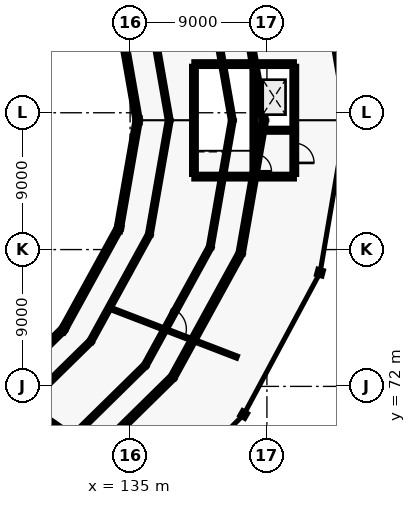
"""IFC4 building model, lengths in metres.
Left out: names, types, materials, properties, quantities, classifications, styles, units other than length and angle.
Written with IfcOpenShell. Run it as: python <this file> out.ifc"""

import sys

from ifc_helpers import new_model, si_unit, direction, frame, frame_2d, origin, origin_2d, place, context, subcontext, project, spatial, rectangle, hollow_circle, extrude, element, fill, save


model = new_model("IFC4")
c1 = context("Model", 3, precision=1e-05, world=origin(), true_north=direction((0.0, 1.0)))
c2 = subcontext(c1, "Body", "Model", "MODEL_VIEW")
j1 = project(units=[si_unit("LENGTHUNIT", "METRE"), si_unit("PLANEANGLEUNIT", "RADIAN")], contexts=[c1])
p1 = place(None, origin())
s1 = spatial("IfcSite", under=j1, at=p1, CompositionType="ELEMENT")
p2 = place(p1, origin())
s2 = spatial("IfcBuilding", under=s1, at=p2, CompositionType="ELEMENT")
p3 = place(p2, frame((0.0, 0.0, 9.6)))
s3 = spatial("IfcBuildingStorey", under=s2, at=p3, CompositionType="ELEMENT", Elevation=9.6)
for number, where, z_axis, x_axis in (
    (1, (135.5, 89.5, 0.0), (0.0, 0.0, 1.0), (1.0, 0.0, 0.0)),
    (2, (130.61, 75.75, 0.0), (0.0, 0.0, 1.0), (0.866, -0.5, 0.0)),
):
    element("IfcColumn", number, at=place(p3, frame(where, z_axis=z_axis, x_axis=x_axis)), inside=s3, PredefinedType="COLUMN", context=c2, shape_type="SweptSolid", body=[
        extrude(hollow_circle(Radius=0.162, WallThickness=0.016, at=origin_2d()), origin(), (0.0, 0.0, 1.0), 4.38),
    ])
p4 = place(p3, frame((142.474, 70.15, 0.0), z_axis=(0.0, 0.0, 1.0), x_axis=(0.866025403784, -0.5, 0.0)))
e3 = element("IfcColumn", 3, at=p4, inside=s3, PredefinedType="COLUMN", context=c2, shape_type="SweptSolid", body=[
    extrude(hollow_circle(Radius=0.178, WallThickness=0.016, at=origin_2d()), origin(), (0.0, 0.0, 1.0), 3.38),
])
p5 = place(p3, frame((134.256, 82.382, 0.0), z_axis=(0.0, 0.0, 1.0), x_axis=(0.965925826289, -0.258819045103, 0.0)))
e4 = element("IfcColumn", 4, at=p5, inside=s3, PredefinedType="COLUMN", context=c2, shape_type="SweptSolid", body=[
    extrude(hollow_circle(Radius=0.162, WallThickness=0.016, at=origin_2d()), origin(), (0.0, 0.0, 1.0), 4.38),
])
p6 = place(p3, frame((147.489, 79.484, 0.0), z_axis=(0.0, 0.0, 1.0), x_axis=(0.965925826289, -0.258819045103, 0.0)))
e5 = element("IfcColumn", 5, at=p6, inside=s3, PredefinedType="COLUMN", context=c2, shape_type="SweptSolid", body=[
    extrude(hollow_circle(Radius=0.178, WallThickness=0.016, at=origin_2d()), origin(), (0.0, 0.0, 1.0), 3.38),
])
p7 = place(p3, frame((143.8, 89.5, 4.53), z_axis=(0.0, 0.0, 1.0), x_axis=(-0.171964181022, 0.985103202941, 0.0)))
e6 = element("IfcWall", 6, at=p7, inside=s3, PredefinedType="SOLIDWALL", context=c2, shape_type="SweptSolid", body=[
    extrude(rectangle(XDim=8.88, YDim=0.34, at=frame_2d((4.44, 0.0))), origin(), (0.0, 0.0, 1.0), 3.02),
])
p8 = place(p3, frame((135.5, 89.5, 4.39), z_axis=(0.0, 0.0, 1.0), x_axis=(-0.172146745201, 0.985071316259, 0.0)))
e7 = element("IfcWall", 7, at=p8, inside=s3, PredefinedType="SOLIDWALL", context=c2, shape_type="SweptSolid", body=[
    extrude(rectangle(XDim=7.226, YDim=0.34, at=frame_2d((3.613, 0.0))), origin(), (0.0, 0.0, 1.0), 3.16),
])
p9 = place(p3, frame((141.725, 89.5, 7.58), z_axis=(0.0, 0.0, 1.0), x_axis=(-0.171983700119, 0.985099795398, 0.0)))
e8 = element("IfcWall", 8, at=p9, inside=s3, PredefinedType="SOLIDWALL", context=c2, shape_type="SweptSolid", body=[
    extrude(rectangle(XDim=8.466, YDim=0.24, at=frame_2d((4.233, 0.0))), origin(), (0.0, 0.0, 1.0), 2.37),
])
p10 = place(p3, frame((137.575, 89.5, 7.58), z_axis=(0.0, 0.0, 1.0), x_axis=(-0.172012838792, 0.985094707777, 0.0)))
e9 = element("IfcWall", 9, at=p10, inside=s3, PredefinedType="SOLIDWALL", context=c2, shape_type="SweptSolid", body=[
    extrude(rectangle(XDim=7.639, YDim=0.24, at=frame_2d((3.819, 0.0))), origin(), (0.0, 0.0, 1.0), 2.37),
])
p11 = place(p3, frame((130.678, 65.6, 4.53), z_axis=(0.0, 0.0, 1.0), x_axis=(0.713096204455, 0.701066190307, 0.0)))
e10 = element("IfcWall", 10, at=p11, inside=s3, PredefinedType="SOLIDWALL", context=c2, shape_type="SweptSolid", body=[
    extrude(rectangle(XDim=9.985, YDim=0.34, at=frame_2d((4.992, 0.0))), origin(), (0.0, 0.0, 1.0), 3.02),
])
p12 = place(p3, frame((124.809, 70.055, 4.39), z_axis=(0.0, 0.0, 1.0), x_axis=(0.713593723838, 0.700559774251, 0.0)))
e11 = element("IfcWall", 11, at=p12, inside=s3, PredefinedType="SOLIDWALL", context=c2, shape_type="SweptSolid", body=[
    extrude(rectangle(XDim=8.129, YDim=0.34, at=frame_2d((4.065, 0.0))), origin(), (0.0, 0.0, 1.0), 3.16),
])
p13 = place(p3, frame((129.211, 66.713, 7.58), z_axis=(0.0, 0.0, 1.0), x_axis=(0.713170660677, 0.700990448401, 0.0)))
e12 = element("IfcWall", 12, at=p13, inside=s3, PredefinedType="SOLIDWALL", context=c2, shape_type="SweptSolid", body=[
    extrude(rectangle(XDim=9.521, YDim=0.24, at=frame_2d((4.76, 0.0))), origin(), (0.0, 0.0, 1.0), 2.37),
])
p14 = place(p3, frame((126.277, 68.941, 7.58), z_axis=(0.0, 0.0, 1.0), x_axis=(0.713414677491, 0.700742105157, 0.0)))
e13 = element("IfcWall", 13, at=p14, inside=s3, PredefinedType="SOLIDWALL", context=c2, shape_type="SweptSolid", body=[
    extrude(rectangle(XDim=8.592, YDim=0.24, at=frame_2d((4.296, 0.0))), origin(), (0.0, 0.0, 1.0), 2.37),
])
p15 = place(p3, frame((137.798, 72.6, 4.53), z_axis=(0.0, 0.0, 1.0), x_axis=(0.481203038707, 0.876609169208, 0.0)))
e14 = element("IfcWall", 14, at=p15, inside=s3, PredefinedType="SOLIDWALL", context=c2, shape_type="SweptSolid", body=[
    extrude(rectangle(XDim=9.299, YDim=0.34, at=frame_2d((4.65, 0.0))), origin(), (0.0, 0.0, 1.0), 3.02),
])
p16 = place(p3, frame((130.61, 75.75, 4.39), z_axis=(0.0, 0.0, 1.0), x_axis=(0.481751565348, 0.876307839338, 0.0)))
e15 = element("IfcWall", 15, at=p16, inside=s3, PredefinedType="SOLIDWALL", context=c2, shape_type="SweptSolid", body=[
    extrude(rectangle(XDim=7.568, YDim=0.34, at=frame_2d((3.784, 0.0))), origin(), (0.0, 0.0, 1.0), 3.16),
])
p17 = place(p3, frame((136.001, 73.387, 7.58), z_axis=(0.0, 0.0, 1.0), x_axis=(0.48130775835, 0.876551676601, 0.0)))
e16 = element("IfcWall", 16, at=p17, inside=s3, PredefinedType="SOLIDWALL", context=c2, shape_type="SweptSolid", body=[
    extrude(rectangle(XDim=8.868, YDim=0.24, at=frame_2d((4.434, 0.0))), origin(), (0.0, 0.0, 1.0), 2.37),
])
p18 = place(p3, frame((132.407, 74.962, 7.58), z_axis=(0.0, 0.0, 1.0), x_axis=(0.481607192972, 0.876387192785, 0.0)))
e17 = element("IfcWall", 17, at=p18, inside=s3, PredefinedType="SOLIDWALL", context=c2, shape_type="SweptSolid", body=[
    extrude(rectangle(XDim=8.002, YDim=0.24, at=frame_2d((4.001, 0.0))), origin(), (0.0, 0.0, 1.0), 2.37),
])
p19 = place(p3, frame((142.273, 80.752, 4.53), z_axis=(0.0, 0.0, 1.0), x_axis=(0.171964181022, 0.985103202941, 0.0)))
e18 = element("IfcWall", 18, at=p19, inside=s3, PredefinedType="SOLIDWALL", context=c2, shape_type="SweptSolid", body=[
    extrude(rectangle(XDim=8.88, YDim=0.34, at=frame_2d((4.44, 0.0))), origin(), (0.0, 0.0, 1.0), 3.02),
])
p20 = place(p3, frame((134.256, 82.382, 4.39), z_axis=(0.0, 0.0, 1.0), x_axis=(0.172146745201, 0.985071316259, 0.0)))
e19 = element("IfcWall", 19, at=p20, inside=s3, PredefinedType="SOLIDWALL", context=c2, shape_type="SweptSolid", body=[
    extrude(rectangle(XDim=7.226, YDim=0.34, at=frame_2d((3.613, 0.0))), origin(), (0.0, 0.0, 1.0), 3.16),
])
p21 = place(p3, frame((140.269, 81.16, 7.58), z_axis=(0.0, 0.0, 1.0), x_axis=(0.171983700119, 0.985099795398, 0.0)))
e20 = element("IfcWall", 20, at=p21, inside=s3, PredefinedType="SOLIDWALL", context=c2, shape_type="SweptSolid", body=[
    extrude(rectangle(XDim=8.466, YDim=0.24, at=frame_2d((4.233, 0.0))), origin(), (0.0, 0.0, 1.0), 2.37),
])
p22 = place(p3, frame((136.261, 81.975, 7.58), z_axis=(0.0, 0.0, 1.0), x_axis=(0.172012838792, 0.985094707777, 0.0)))
e21 = element("IfcWall", 21, at=p22, inside=s3, PredefinedType="SOLIDWALL", context=c2, shape_type="SweptSolid", body=[
    extrude(rectangle(XDim=7.639, YDim=0.24, at=frame_2d((3.819, 0.0))), origin(), (0.0, 0.0, 1.0), 2.37),
])
for number, where, z_axis, x_axis in (
    (22, (139.2, 85.8, 0.0), (0.0, 0.0, 1.0), (1.0, 0.0, 0.0)),
    (23, (139.2, 93.2, 0.0), (0.0, 0.0, 1.0), (1.0, 0.0, 0.0)),
):
    element("IfcWall", number, at=place(p3, frame(where, z_axis=z_axis, x_axis=x_axis)), inside=s3, PredefinedType="SHEAR", context=c2, shape_type="SweptSolid", body=[
        extrude(rectangle(XDim=6.6, YDim=0.3, at=frame_2d((3.3, 0.0))), origin(), (0.0, 0.0, 1.0), 3.4),
    ])
p23 = place(p3, frame((139.2, 85.95, 0.0), z_axis=(0.0, 0.0, 1.0), x_axis=(0.0, 1.0, 0.0)))
e24 = element("IfcWall", 24, at=p23, inside=s3, PredefinedType="SHEAR", context=c2, shape_type="SweptSolid", body=[
    extrude(rectangle(XDim=7.1, YDim=0.3, at=frame_2d((3.55, 0.0))), origin(), (0.0, 0.0, 1.0), 3.4),
])
p24 = place(p3, frame((145.8, 85.95, 0.0), z_axis=(0.0, 0.0, 1.0), x_axis=(0.0, 1.0, 0.0)))
e25 = element("IfcWall", 25, at=p24, inside=s3, PredefinedType="SHEAR", context=c2, shape_type="SweptSolid", body=[
    extrude(rectangle(XDim=7.1, YDim=0.3, at=frame_2d((3.55, 0.0))), origin(), (0.0, 0.0, 1.0), 3.4),
])
p25 = place(p24, frame((0.75, 0.0, 0.0)))
e26 = element("IfcOpeningElement", 26, at=p25, cuts=e25, PredefinedType="OPENING", context=c2, shape_type="SweptSolid", body=[
    extrude(rectangle(XDim=1.3, YDim=2.15, at=frame_2d((0.65, 1.075))), frame((0.0, 0.16, 0.0), z_axis=(0.0, -1.0, 0.0), x_axis=(1.0, 0.0, 0.0)), (0.0, 0.0, 1.0), 0.32),
])
p26 = place(p3, frame((143.15, 85.95, 0.0), z_axis=(0.0, 0.0, 1.0), x_axis=(0.0, 1.0, 0.0)))
e27 = element("IfcWall", 27, at=p26, inside=s3, PredefinedType="SHEAR", context=c2, shape_type="SweptSolid", body=[
    extrude(rectangle(XDim=7.1, YDim=0.25, at=frame_2d((3.55, 0.0))), origin(), (0.0, 0.0, 1.0), 3.4),
])
p27 = place(p26, frame((0.2, 0.0, 0.0)))
e28 = element("IfcOpeningElement", 28, at=p27, cuts=e27, PredefinedType="OPENING", context=c2, shape_type="SweptSolid", body=[
    extrude(rectangle(XDim=1.15, YDim=2.15, at=frame_2d((0.575, 1.075))), frame((0.0, 0.135, 0.0), z_axis=(0.0, -1.0, 0.0), x_axis=(1.0, 0.0, 0.0)), (0.0, 0.0, 1.0), 0.27),
])
p28 = place(p3, frame((143.27, 88.85, 0.0), z_axis=(0.0, 0.0, 1.0), x_axis=(1.0, 0.0, 0.0)))
e29 = element("IfcWall", 29, at=p28, inside=s3, PredefinedType="SHEAR", context=c2, shape_type="SweptSolid", body=[
    extrude(rectangle(XDim=2.38, YDim=0.25, at=frame_2d((1.19, 0.0))), origin(), (0.0, 0.0, 1.0), 3.4),
])
p29 = place(p28, frame((0.64, 0.0, 0.0)))
e30 = element("IfcOpeningElement", 30, at=p29, cuts=e29, PredefinedType="OPENING", context=c2, shape_type="SweptSolid", body=[
    extrude(rectangle(XDim=1.1, YDim=2.15, at=frame_2d((0.55, 1.075))), frame((0.0, 0.135, 0.0), z_axis=(0.0, -1.0, 0.0), x_axis=(1.0, 0.0, 0.0)), (0.0, 0.0, 1.0), 0.27),
])
p30 = place(p3, frame((128.475, 70.626, 0.0), z_axis=(0.0, 0.0, 1.0), x_axis=(0.822666462931, -0.568524309743, 0.0)))
e31 = element("IfcWall", 31, at=p30, inside=s3, PredefinedType="PARTITIONING", context=c2, shape_type="SweptSolid", body=[
    extrude(rectangle(XDim=8.223, YDim=0.13, at=frame_2d((4.112, 0.0))), origin(), (0.0, 0.0, 1.0), 2.9),
])
p31 = place(p30, frame((3.387, 0.0, 0.0)))
e32 = element("IfcOpeningElement", 32, at=p31, cuts=e31, PredefinedType="OPENING", context=c2, shape_type="SweptSolid", body=[
    extrude(rectangle(XDim=1.45, YDim=2.15, at=frame_2d((0.725, 1.075))), frame((0.0, 0.075, 0.0), z_axis=(0.0, -1.0, 0.0), x_axis=(1.0, 0.0, 0.0)), (0.0, 0.0, 1.0), 0.15),
])
p32 = place(p3, frame((133.83, 77.082, 0.0), z_axis=(0.0, 0.0, 1.0), x_axis=(0.933238808021, -0.359256631399, 0.0)))
e33 = element("IfcWall", 33, at=p32, inside=s3, PredefinedType="PARTITIONING", context=c2, shape_type="SweptSolid", body=[
    extrude(rectangle(XDim=8.782, YDim=0.13, at=frame_2d((4.391, 0.0))), origin(), (0.0, 0.0, 1.0), 2.9),
])
p33 = place(p32, frame((3.666, 0.0, 0.0)))
e34 = element("IfcOpeningElement", 34, at=p33, cuts=e33, PredefinedType="OPENING", context=c2, shape_type="SweptSolid", body=[
    extrude(rectangle(XDim=1.45, YDim=2.15, at=frame_2d((0.725, 1.075))), frame((0.0, 0.075, 0.0), z_axis=(0.0, -1.0, 0.0), x_axis=(1.0, 0.0, 0.0)), (0.0, 0.0, 1.0), 0.15),
])
p34 = place(p25, frame((1.3, 0.0, 0.0), z_axis=(0.0, 0.0, 1.0), x_axis=(-1.0, 0.0, 0.0)))
e35 = element("IfcDoor", 35, at=p34, inside=s3, OperationType="DOUBLE_DOOR_SINGLE_SWING", PredefinedType="DOOR", context=c2, shape_type="SweptSolid", body=[
    extrude(rectangle(XDim=1.3, YDim=2.15, at=frame_2d((0.65, 1.075))), frame((0.0, 0.025, 0.0), z_axis=(0.0, -1.0, 0.0), x_axis=(1.0, 0.0, 0.0)), (0.0, 0.0, 1.0), 0.05),
])
fill(e26, e35)
p35 = place(p27, frame((1.15, 0.0, 0.0), z_axis=(0.0, 0.0, 1.0), x_axis=(-1.0, 0.0, 0.0)))
e36 = element("IfcDoor", 36, at=p35, inside=s3, OperationType="SINGLE_SWING_LEFT", PredefinedType="DOOR", context=c2, shape_type="SweptSolid", body=[
    extrude(rectangle(XDim=1.15, YDim=2.15, at=frame_2d((0.575, 1.075))), frame((0.0, 0.025, 0.0), z_axis=(0.0, -1.0, 0.0), x_axis=(1.0, 0.0, 0.0)), (0.0, 0.0, 1.0), 0.05),
])
fill(e28, e36)
p36 = place(p29, origin())
e37 = element("IfcDoor", 37, at=p36, inside=s3, OperationType="SLIDING_TO_LEFT", PredefinedType="DOOR", context=c2, shape_type="SweptSolid", body=[
    extrude(rectangle(XDim=1.1, YDim=2.15, at=frame_2d((0.55, 1.075))), frame((0.0, 0.025, 0.0), z_axis=(0.0, -1.0, 0.0), x_axis=(1.0, 0.0, 0.0)), (0.0, 0.0, 1.0), 0.05),
])
fill(e30, e37)
p37 = place(p33, origin())
e38 = element("IfcDoor", 38, at=p37, inside=s3, OperationType="SINGLE_SWING_LEFT", PredefinedType="DOOR", context=c2, shape_type="SweptSolid", body=[
    extrude(rectangle(XDim=1.45, YDim=2.15, at=frame_2d((0.725, 1.075))), frame((0.0, 0.025, 0.0), z_axis=(0.0, -1.0, 0.0), x_axis=(1.0, 0.0, 0.0)), (0.0, 0.0, 1.0), 0.05),
])
fill(e34, e38)
save(model, sys.argv[1])
